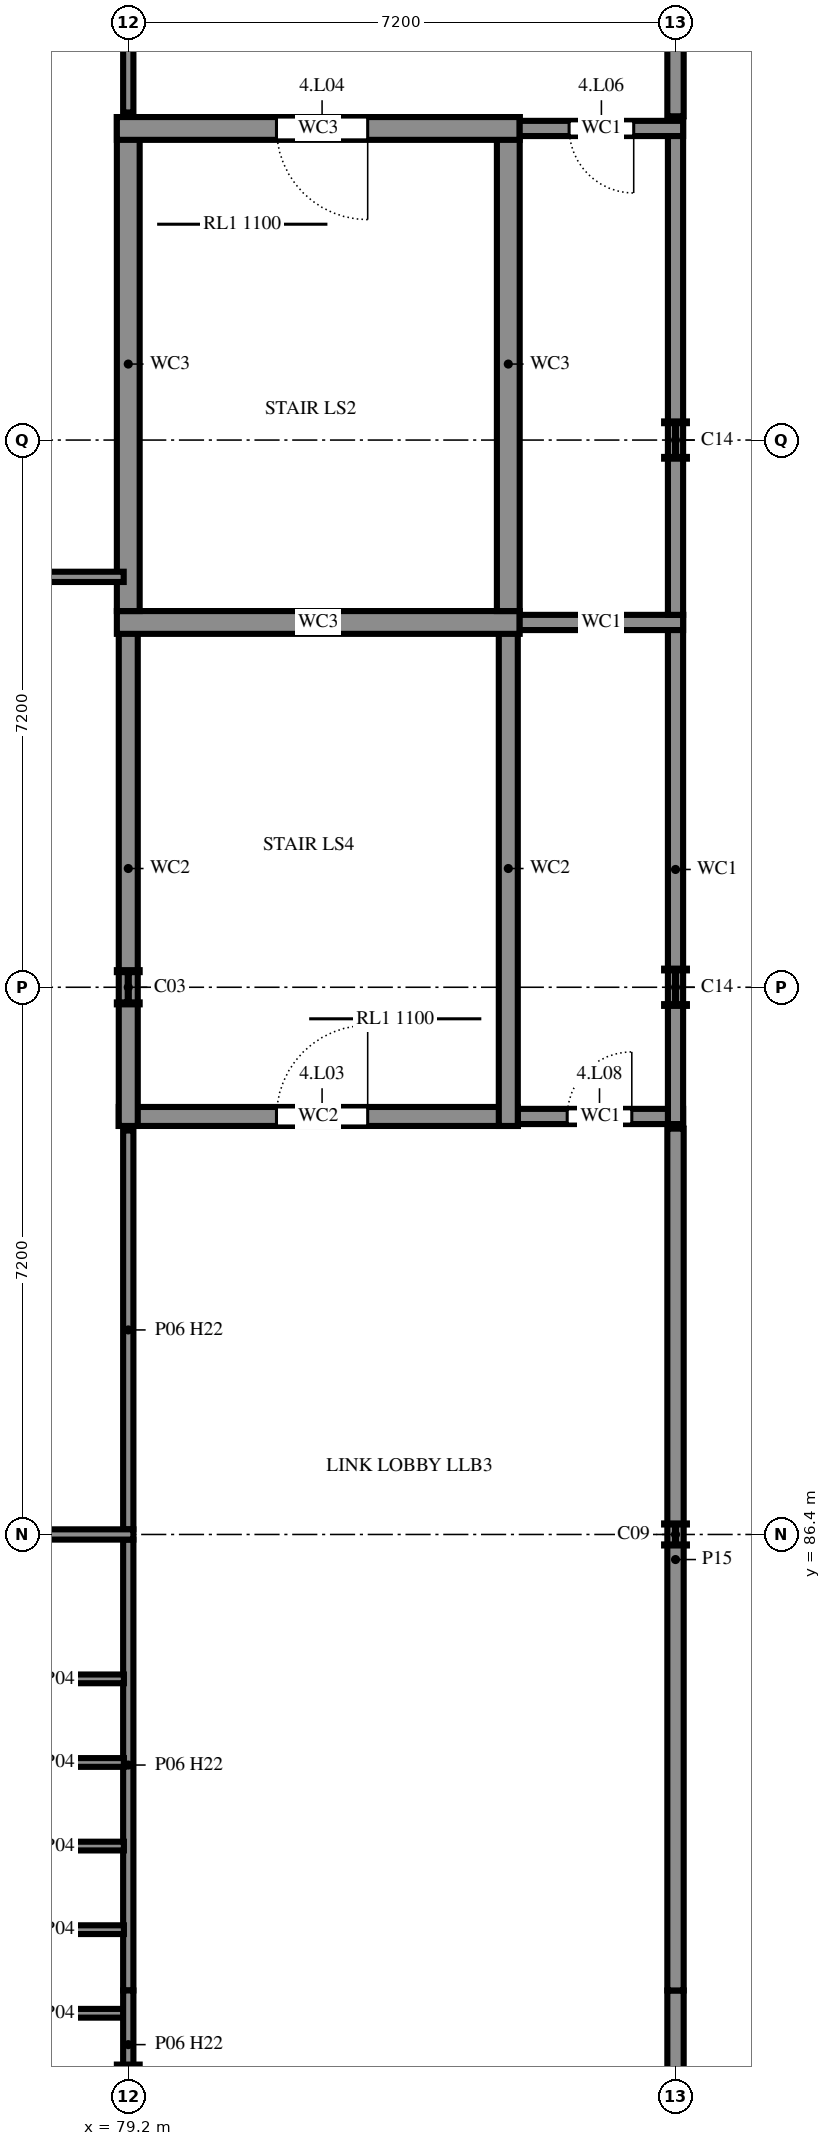
"""IFC4 building model, lengths in metres.
Left out: names, types, materials, properties, quantities, classifications, styles, units other than length and angle.
Written with IfcOpenShell. Run it as: python <this file> out.ifc"""

import sys

from ifc_helpers import new_model, si_unit, direction, frame, frame_2d, origin, origin_2d, place, context, subcontext, project, spatial, rectangle, i_section, extrude, element, fill, save


model = new_model("IFC4")
c1 = context("Model", 3, precision=1e-05, world=origin(), true_north=direction((0.0, 1.0)))
c2 = subcontext(c1, "Body", "Model", "MODEL_VIEW")
j1 = project(units=[si_unit("LENGTHUNIT", "METRE"), si_unit("PLANEANGLEUNIT", "RADIAN")], contexts=[c1])
p1 = place(None, origin())
s1 = spatial("IfcSite", under=j1, at=p1, CompositionType="ELEMENT")
p2 = place(p1, origin())
s2 = spatial("IfcBuilding", under=s1, at=p2, CompositionType="ELEMENT")
p3 = place(p2, frame((0.0, 0.0, 14.4)))
s3 = spatial("IfcBuildingStorey", under=s2, at=p3, CompositionType="ELEMENT", Elevation=14.4)
for number, where, z_axis, x_axis in (
    (1, (79.2, 79.2, 0.0), (0.0, 0.0, 1.0), (1.0, 0.0, 0.0)),
    (2, (79.2, 93.6, 0.0), (0.0, 0.0, 1.0), (1.0, 0.0, 0.0)),
):
    element("IfcColumn", number, at=place(p3, frame(where, z_axis=z_axis, x_axis=x_axis)), inside=s3, PredefinedType="COLUMN", context=c2, shape_type="SweptSolid", body=[
        extrude(i_section(OverallWidth=0.3, OverallDepth=0.45, WebThickness=0.014, FlangeThickness=0.026, FilletRadius=0.027, at=origin_2d()), origin(), (0.0, 0.0, 1.0), 3.6),
    ])
p4 = place(p3, frame((86.4, 86.4, 0.0), z_axis=(0.0, 0.0, 1.0), x_axis=(1.0, 0.0, 0.0)))
e3 = element("IfcColumn", 3, at=p4, inside=s3, PredefinedType="COLUMN", context=c2, shape_type="SweptSolid", body=[
    extrude(i_section(OverallWidth=0.3, OverallDepth=0.29, WebThickness=0.009, FlangeThickness=0.014, FilletRadius=0.027, at=origin_2d()), origin(), (0.0, 0.0, 1.0), 3.6),
])
for number, where, z_axis, x_axis in (
    (4, (86.4, 93.6, 0.0), (0.0, 0.0, 1.0), (1.0, 0.0, 0.0)),
    (5, (86.4, 100.8, 0.0), (0.0, 0.0, 1.0), (1.0, 0.0, 0.0)),
):
    element("IfcColumn", number, at=place(p3, frame(where, z_axis=z_axis, x_axis=x_axis)), inside=s3, PredefinedType="COLUMN", context=c2, shape_type="SweptSolid", body=[
        extrude(i_section(OverallWidth=0.3, OverallDepth=0.49, WebThickness=0.012, FlangeThickness=0.023, FilletRadius=0.027, at=origin_2d()), origin(), (0.0, 0.0, 1.0), 3.6),
    ])
p5 = place(p3, frame((79.075, 91.9, 0.0), z_axis=(0.0, 0.0, 1.0), x_axis=(1.0, 0.0, 0.0)))
e6 = element("IfcWall", 6, at=p5, inside=s3, PredefinedType="SHEAR", context=c2, shape_type="SweptSolid", body=[
    extrude(rectangle(XDim=5.25, YDim=0.25, at=frame_2d((2.625, 0.0))), origin(), (0.0, 0.0, 1.0), 3.6),
])
p6 = place(p5, frame((2.075, 0.0, 0.0)))
e7 = element("IfcOpeningElement", 7, at=p6, cuts=e6, PredefinedType="OPENING", context=c2, shape_type="SweptSolid", body=[
    extrude(rectangle(XDim=1.2, YDim=2.4, at=frame_2d((0.6, 1.2))), frame((0.0, 0.135, 0.0), z_axis=(0.0, -1.0, 0.0), x_axis=(1.0, 0.0, 0.0)), (0.0, 0.0, 1.0), 0.27),
])
p7 = place(p3, frame((84.325, 91.9, 0.0), z_axis=(0.0, 0.0, 1.0), x_axis=(1.0, 0.0, 0.0)))
e8 = element("IfcWall", 8, at=p7, inside=s3, PredefinedType="SHEAR", context=c2, shape_type="SweptSolid", body=[
    extrude(rectangle(XDim=2.175, YDim=0.2, at=frame_2d((1.087, 0.0))), origin(), (0.0, 0.0, 1.0), 3.6),
])
p8 = place(p7, frame((0.65, 0.0, 0.0)))
e9 = element("IfcOpeningElement", 9, at=p8, cuts=e8, PredefinedType="OPENING", context=c2, shape_type="SweptSolid", body=[
    extrude(rectangle(XDim=0.85, YDim=2.1, at=frame_2d((0.425, 1.05))), frame((0.0, 0.11, 0.0), z_axis=(0.0, -1.0, 0.0), x_axis=(1.0, 0.0, 0.0)), (0.0, 0.0, 1.0), 0.22),
])
p9 = place(p3, frame((84.2, 91.775, 0.0), z_axis=(0.0, 0.0, 1.0), x_axis=(0.0, 1.0, 0.0)))
e10 = element("IfcWall", 10, at=p9, inside=s3, PredefinedType="SHEAR", context=c2, shape_type="SweptSolid", body=[
    extrude(rectangle(XDim=6.775, YDim=0.25, at=frame_2d((3.388, 0.0))), origin(), (0.0, 0.0, 1.0), 3.6),
])
p10 = place(p3, frame((86.4, 91.8, 0.0), z_axis=(0.0, 0.0, 1.0), x_axis=(0.0, 1.0, 0.0)))
e11 = element("IfcWall", 11, at=p10, inside=s3, PredefinedType="SHEAR", context=c2, shape_type="SweptSolid", body=[
    extrude(rectangle(XDim=6.7, YDim=0.2, at=frame_2d((3.35, 0.0))), origin(), (0.0, 0.0, 1.0), 3.6),
])
p11 = place(p3, frame((79.2, 98.55, 0.0), z_axis=(0.0, 0.0, 1.0), x_axis=(0.0, -1.0, 0.0)))
e12 = element("IfcWall", 12, at=p11, inside=s3, PredefinedType="SHEAR", context=c2, shape_type="SweptSolid", body=[
    extrude(rectangle(XDim=6.775, YDim=0.25, at=frame_2d((3.388, 0.0))), origin(), (0.0, 0.0, 1.0), 3.6),
])
p12 = place(p3, frame((84.35, 98.4, 0.0), z_axis=(0.0, 0.0, 1.0), x_axis=(-1.0, 0.0, 0.0)))
e13 = element("IfcWall", 13, at=p12, inside=s3, PredefinedType="SHEAR", context=c2, shape_type="SweptSolid", body=[
    extrude(rectangle(XDim=5.3, YDim=0.3, at=frame_2d((2.65, 0.0))), origin(), (0.0, 0.0, 1.0), 3.6),
])
p13 = place(p3, frame((84.35, 98.4, 0.0), z_axis=(0.0, 0.0, 1.0), x_axis=(1.0, 0.0, 0.0)))
e14 = element("IfcWall", 14, at=p13, inside=s3, PredefinedType="SHEAR", context=c2, shape_type="SweptSolid", body=[
    extrude(rectangle(XDim=2.15, YDim=0.2, at=frame_2d((1.075, 0.0))), origin(), (0.0, 0.0, 1.0), 3.6),
])
p14 = place(p3, frame((84.2, 98.55, 0.0), z_axis=(0.0, 0.0, 1.0), x_axis=(0.0, 1.0, 0.0)))
e15 = element("IfcWall", 15, at=p14, inside=s3, PredefinedType="SHEAR", context=c2, shape_type="SweptSolid", body=[
    extrude(rectangle(XDim=6.5, YDim=0.3, at=frame_2d((3.25, 0.0))), origin(), (0.0, 0.0, 1.0), 3.6),
])
p15 = place(p3, frame((86.4, 98.5, 0.0), z_axis=(0.0, 0.0, 1.0), x_axis=(0.0, 1.0, 0.0)))
e16 = element("IfcWall", 16, at=p15, inside=s3, PredefinedType="SHEAR", context=c2, shape_type="SweptSolid", body=[
    extrude(rectangle(XDim=6.5, YDim=0.2, at=frame_2d((3.25, 0.0))), origin(), (0.0, 0.0, 1.0), 3.6),
])
p16 = place(p3, frame((79.2, 105.05, 0.0), z_axis=(0.0, 0.0, 1.0), x_axis=(0.0, -1.0, 0.0)))
e17 = element("IfcWall", 17, at=p16, inside=s3, PredefinedType="SHEAR", context=c2, shape_type="SweptSolid", body=[
    extrude(rectangle(XDim=6.5, YDim=0.3, at=frame_2d((3.25, 0.0))), origin(), (0.0, 0.0, 1.0), 3.6),
])
p17 = place(p3, frame((84.35, 104.9, 0.0), z_axis=(0.0, 0.0, 1.0), x_axis=(-1.0, 0.0, 0.0)))
e18 = element("IfcWall", 18, at=p17, inside=s3, PredefinedType="SHEAR", context=c2, shape_type="SweptSolid", body=[
    extrude(rectangle(XDim=5.3, YDim=0.3, at=frame_2d((2.65, 0.0))), origin(), (0.0, 0.0, 1.0), 3.6),
])
p18 = place(p17, frame((2.0, 0.0, 0.0)))
e19 = element("IfcOpeningElement", 19, at=p18, cuts=e18, PredefinedType="OPENING", context=c2, shape_type="SweptSolid", body=[
    extrude(rectangle(XDim=1.2, YDim=2.4, at=frame_2d((0.6, 1.2))), frame((0.0, 0.16, 0.0), z_axis=(0.0, -1.0, 0.0), x_axis=(1.0, 0.0, 0.0)), (0.0, 0.0, 1.0), 0.32),
])
p19 = place(p3, frame((86.5, 104.9, 0.0), z_axis=(0.0, 0.0, 1.0), x_axis=(-1.0, 0.0, 0.0)))
e20 = element("IfcWall", 20, at=p19, inside=s3, PredefinedType="SHEAR", context=c2, shape_type="SweptSolid", body=[
    extrude(rectangle(XDim=2.15, YDim=0.2, at=frame_2d((1.075, 0.0))), origin(), (0.0, 0.0, 1.0), 3.6),
])
p20 = place(p19, frame((0.65, 0.0, 0.0)))
e21 = element("IfcOpeningElement", 21, at=p20, cuts=e20, PredefinedType="OPENING", context=c2, shape_type="SweptSolid", body=[
    extrude(rectangle(XDim=0.85, YDim=2.1, at=frame_2d((0.425, 1.05))), frame((0.0, 0.11, 0.0), z_axis=(0.0, -1.0, 0.0), x_axis=(1.0, 0.0, 0.0)), (0.0, 0.0, 1.0), 0.22),
])
p21 = place(p3, frame((86.4, 80.4, 0.0), z_axis=(0.0, 0.0, 1.0), x_axis=(0.0, -1.0, 0.0)))
e22 = element("IfcWall", 22, at=p21, inside=s3, PredefinedType="PARTITIONING", context=c2, shape_type="SweptSolid", body=[
    extrude(rectangle(XDim=8.24, YDim=0.215, at=frame_2d((4.12, 0.0))), origin(), (0.0, 0.0, 1.0), 3.12),
])
p22 = place(p3, frame((79.2, 86.333, 0.0), z_axis=(0.0, 0.0, 1.0), x_axis=(0.0, -1.0, 0.0)))
e23 = element("IfcWall", 23, at=p22, inside=s3, PredefinedType="PARTITIONING", context=c2, shape_type="SweptSolid", body=[
    extrude(rectangle(XDim=5.933, YDim=0.135, at=frame_2d((2.966, 0.0))), origin(), (0.0, 0.0, 1.0), 2.87),
])
p23 = place(p3, frame((79.2, 91.715, 0.0), z_axis=(0.0, 0.0, 1.0), x_axis=(0.0, -1.0, 0.0)))
e24 = element("IfcWall", 24, at=p23, inside=s3, PredefinedType="PARTITIONING", context=c2, shape_type="SweptSolid", body=[
    extrude(rectangle(XDim=5.248, YDim=0.135, at=frame_2d((2.624, 0.0))), origin(), (0.0, 0.0, 1.0), 2.87),
])
p24 = place(p3, frame((86.4, 80.4, 0.0), z_axis=(0.0, 0.0, 1.0), x_axis=(0.0, 1.0, 0.0)))
e25 = element("IfcWall", 25, at=p24, inside=s3, PredefinedType="PARTITIONING", context=c2, shape_type="SweptSolid", body=[
    extrude(rectangle(XDim=11.34, YDim=0.215, at=frame_2d((5.67, 0.0))), origin(), (0.0, 0.0, 1.0), 3.12),
])
p25 = place(p3, frame((79.2, 107.933, 0.0), z_axis=(0.0, 0.0, 1.0), x_axis=(0.0, -1.0, 0.0)))
e26 = element("IfcWall", 26, at=p25, inside=s3, PredefinedType="PARTITIONING", context=c2, shape_type="SweptSolid", body=[
    extrude(rectangle(XDim=2.823, YDim=0.135, at=frame_2d((1.411, 0.0))), origin(), (0.0, 0.0, 1.0), 3.219),
])
p26 = place(p3, frame((86.4, 105.06, 0.0), z_axis=(0.0, 0.0, 1.0), x_axis=(0.0, 1.0, 0.0)))
e27 = element("IfcWall", 27, at=p26, inside=s3, PredefinedType="PARTITIONING", context=c2, shape_type="SweptSolid", body=[
    extrude(rectangle(XDim=2.795, YDim=0.215, at=frame_2d((1.397, 0.0))), origin(), (0.0, 0.0, 1.0), 3.6),
])
p27 = place(p3, frame((71.333, 86.4, 0.0), z_axis=(0.0, 0.0, 1.0), x_axis=(1.0, 0.0, 0.0)))
e28 = element("IfcWall", 28, at=p27, inside=s3, PredefinedType="PARTITIONING", context=c2, shape_type="SweptSolid", body=[
    extrude(rectangle(XDim=7.935, YDim=0.135, at=frame_2d((3.968, 0.0))), origin(), (0.0, 0.0, 1.0), 2.969),
])
p28 = place(p3, frame((71.333, 99.0, 0.0), z_axis=(0.0, 0.0, 1.0), x_axis=(1.0, 0.0, 0.0)))
e29 = element("IfcWall", 29, at=p28, inside=s3, PredefinedType="PARTITIONING", context=c2, shape_type="SweptSolid", body=[
    extrude(rectangle(XDim=7.807, YDim=0.135, at=frame_2d((3.904, 0.0))), origin(), (0.0, 0.0, 1.0), 3.42),
])
for number, where, z_axis, x_axis in (
    (30, (79.143, 80.1, 0.0), (0.0, 0.0, 1.0), (-1.0, 0.0, 0.0)),
    (31, (79.143, 81.2, 0.0), (0.0, 0.0, 1.0), (-1.0, 0.0, 0.0)),
    (32, (79.143, 82.3, 0.0), (0.0, 0.0, 1.0), (-1.0, 0.0, 0.0)),
    (33, (79.143, 83.4, 0.0), (0.0, 0.0, 1.0), (-1.0, 0.0, 0.0)),
    (34, (79.143, 84.5, 0.0), (0.0, 0.0, 1.0), (-1.0, 0.0, 0.0)),
):
    element("IfcWall", number, at=place(p3, frame(where, z_axis=z_axis, x_axis=x_axis)), inside=s3, PredefinedType="PARTITIONING", context=c2, shape_type="SweptSolid", body=[
        extrude(rectangle(XDim=1.685, YDim=0.115, at=frame_2d((0.843, 0.0))), origin(), (0.0, 0.0, 1.0), 3.42),
    ])
p29 = place(p3, frame((79.2, 78.975, 0.0), z_axis=(0.0, 0.0, 1.0), x_axis=(0.0, 1.0, 0.0)))
e35 = element("IfcWall", 35, at=p29, inside=s3, PredefinedType="PARTITIONING", context=c2, shape_type="SweptSolid", body=[
    extrude(rectangle(XDim=1.425, YDim=0.135, at=frame_2d((0.712, 0.0))), origin(), (0.0, 0.0, 1.0), 2.87),
])
p30 = place(p6, origin())
e36 = element("IfcDoor", 36, at=p30, inside=s3, OperationType="SINGLE_SWING_LEFT", PredefinedType="DOOR", context=c2, shape_type="SweptSolid", body=[
    extrude(rectangle(XDim=1.2, YDim=2.4, at=frame_2d((0.6, 1.2))), frame((0.0, 0.025, 0.0), z_axis=(0.0, -1.0, 0.0), x_axis=(1.0, 0.0, 0.0)), (0.0, 0.0, 1.0), 0.05),
])
fill(e7, e36)
p31 = place(p18, origin())
e37 = element("IfcDoor", 37, at=p31, inside=s3, OperationType="SINGLE_SWING_RIGHT", PredefinedType="DOOR", context=c2, shape_type="SweptSolid", body=[
    extrude(rectangle(XDim=1.2, YDim=2.4, at=frame_2d((0.6, 1.2))), frame((0.0, 0.025, 0.0), z_axis=(0.0, -1.0, 0.0), x_axis=(1.0, 0.0, 0.0)), (0.0, 0.0, 1.0), 0.05),
])
fill(e19, e37)
p32 = place(p20, origin())
e38 = element("IfcDoor", 38, at=p32, inside=s3, OperationType="SINGLE_SWING_RIGHT", PredefinedType="DOOR", context=c2, shape_type="SweptSolid", body=[
    extrude(rectangle(XDim=0.85, YDim=2.1, at=frame_2d((0.425, 1.05))), frame((0.0, 0.025, 0.0), z_axis=(0.0, -1.0, 0.0), x_axis=(1.0, 0.0, 0.0)), (0.0, 0.0, 1.0), 0.05),
])
fill(e21, e38)
p33 = place(p8, origin())
e39 = element("IfcDoor", 39, at=p33, inside=s3, OperationType="SINGLE_SWING_LEFT", PredefinedType="DOOR", context=c2, shape_type="SweptSolid", body=[
    extrude(rectangle(XDim=0.85, YDim=2.1, at=frame_2d((0.425, 1.05))), frame((0.0, 0.025, 0.0), z_axis=(0.0, -1.0, 0.0), x_axis=(1.0, 0.0, 0.0)), (0.0, 0.0, 1.0), 0.05),
])
fill(e9, e39)
save(model, sys.argv[1])
